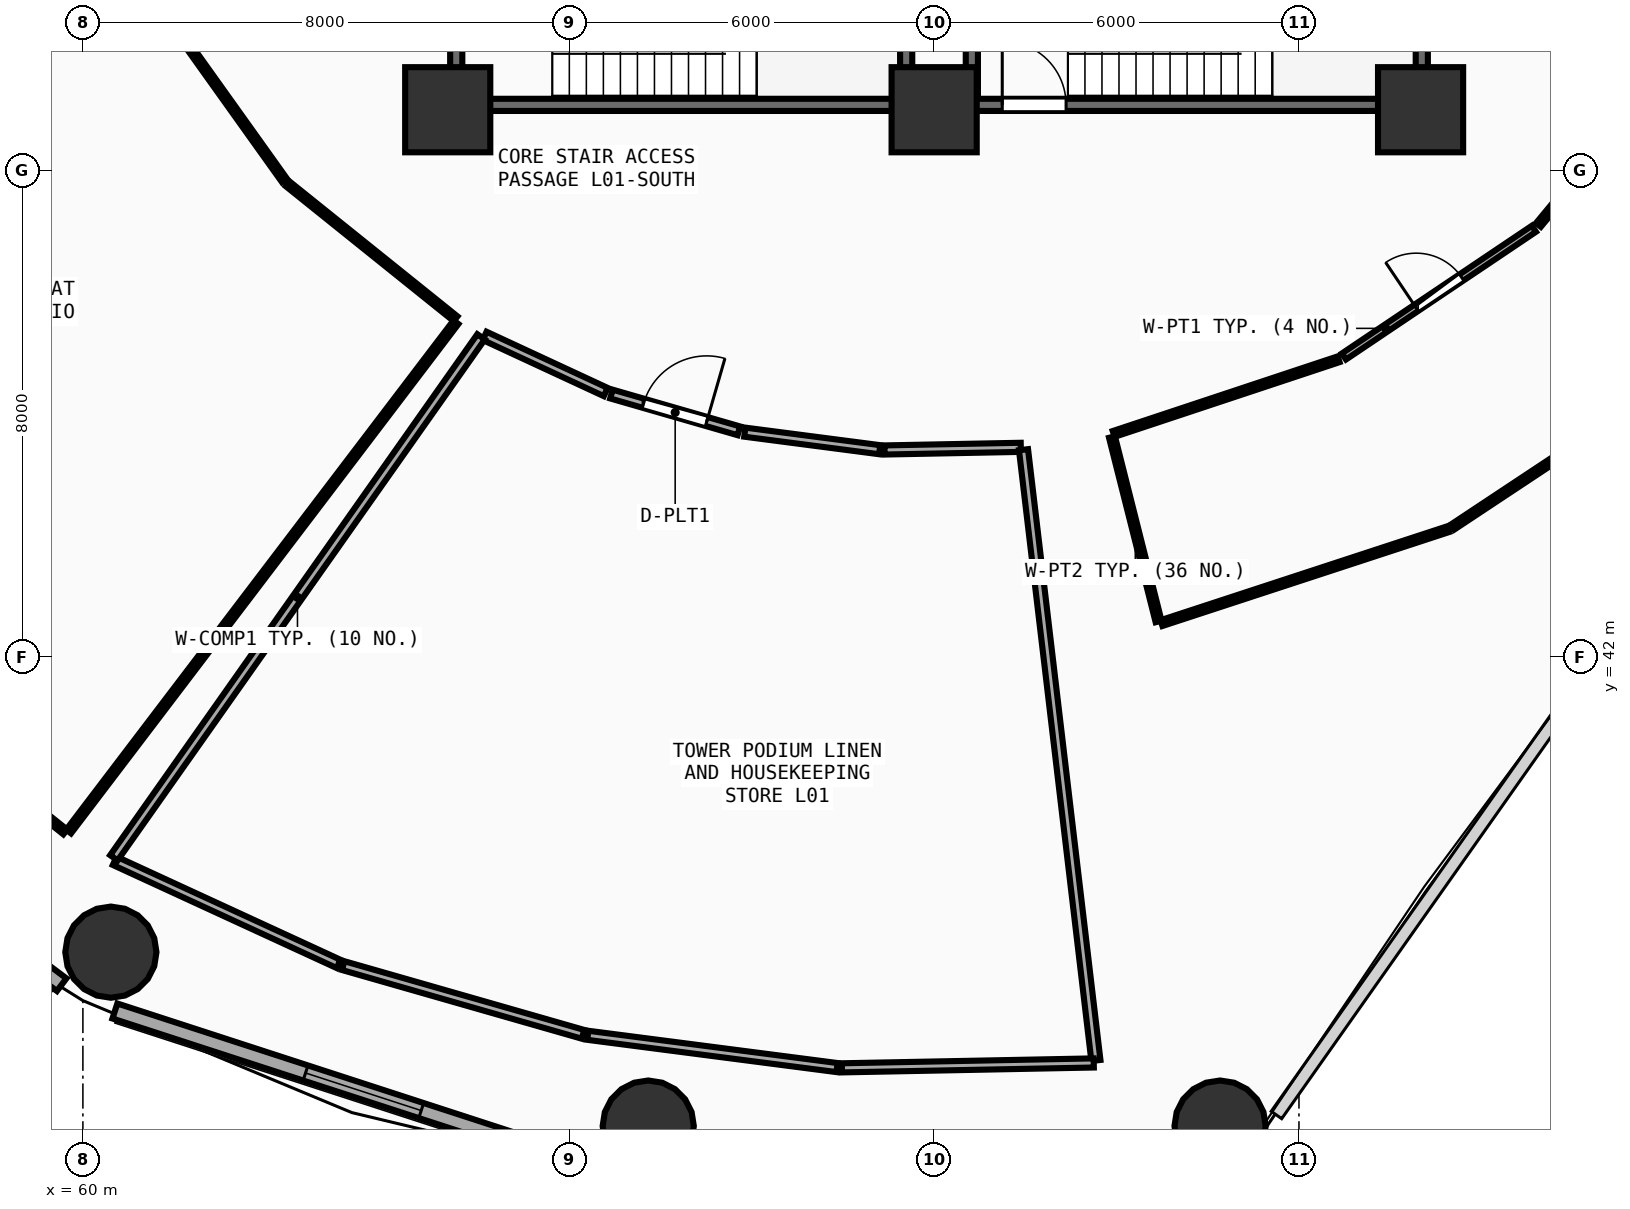
"""IFC4 building model, lengths in metres.
Left out: names, types, materials, properties, quantities, classifications, styles, units other than length and angle.
Written with IfcOpenShell. Run it as: python <this file> out.ifc"""

import sys

from ifc_helpers import new_model, si_unit, direction, frame, frame_2d, origin, origin_2d, place, context, subcontext, project, spatial, rectangle, circle, extrude, element, fill, save


model = new_model("IFC4")
c1 = context("Model", 3, precision=1e-05, world=origin(), true_north=direction((0.0, 1.0)))
c2 = subcontext(c1, "Body", "Model", "MODEL_VIEW")
j1 = project(units=[si_unit("LENGTHUNIT", "METRE"), si_unit("PLANEANGLEUNIT", "RADIAN")], contexts=[c1])
p1 = place(None, origin())
s1 = spatial("IfcSite", under=j1, at=p1, CompositionType="ELEMENT")
p2 = place(p1, origin())
s2 = spatial("IfcBuilding", under=s1, at=p2, CompositionType="ELEMENT")
p3 = place(p2, frame((0.0, 0.0, 4.5)))
s3 = spatial("IfcBuildingStorey", under=s2, at=p3, CompositionType="ELEMENT", Elevation=4.5)
for number, where, z_axis, x_axis in (
    (1, (66.0, 51.0, 0.0), (0.0, 0.0, 1.0), (1.0, 0.0, 0.0)),
    (2, (74.0, 51.0, 0.0), (0.0, 0.0, 1.0), (1.0, 0.0, 0.0)),
    (3, (82.0, 51.0, 0.0), (0.0, 0.0, 1.0), (1.0, 0.0, 0.0)),
):
    element("IfcColumn", number, at=place(p3, frame(where, z_axis=z_axis, x_axis=x_axis)), inside=s3, PredefinedType="PILASTER", context=c2, shape_type="SweptSolid", body=[
        extrude(rectangle(XDim=1.4, YDim=1.4, at=origin_2d()), origin(), (0.0, 0.0, 1.0), 4.5),
    ])
for number, where, z_axis, x_axis in (
    (4, (60.46, 37.146, 0.0), (0.0, 0.0, 1.0), (1.0, 0.0, 0.0)),
    (5, (69.298, 34.286, 0.0), (0.0, 0.0, 1.0), (1.0, 0.0, 0.0)),
    (6, (78.702, 34.286, 0.0), (0.0, 0.0, 1.0), (1.0, 0.0, 0.0)),
):
    element("IfcColumn", number, at=place(p3, frame(where, z_axis=z_axis, x_axis=x_axis)), inside=s3, PredefinedType="COLUMN", context=c2, shape_type="SweptSolid", body=[
        extrude(circle(Radius=0.75, at=origin_2d()), origin(), (0.0, 0.0, 1.0), 4.5),
    ])
p4 = place(p3, frame((53.016, 41.582, 0.0), z_axis=(0.0, 0.0, 1.0), x_axis=(0.80030733173, -0.599590005569, 0.0)))
e7 = element("IfcWall", 7, at=p4, inside=s3, PredefinedType="SOLIDWALL", context=c2, shape_type="SweptSolid", body=[
    extrude(rectangle(XDim=8.291, YDim=0.26, at=frame_2d((4.145, 0.0))), origin(), (0.0, 0.0, 1.0), 4.185),
])
p5 = place(p4, frame((3.145, 0.0, 0.85)))
e8 = element("IfcOpeningElement", 8, at=p5, cuts=e7, PredefinedType="OPENING", context=c2, shape_type="SweptSolid", body=[
    extrude(rectangle(XDim=2.0, YDim=1.75, at=frame_2d((1.0, 0.875))), frame((0.0, 0.14, 0.0), z_axis=(0.0, -1.0, 0.0), x_axis=(1.0, 0.0, 0.0)), (0.0, 0.0, 1.0), 0.28),
])
p6 = place(p3, frame((60.526, 36.178, 0.0), z_axis=(0.0, 0.0, 1.0), x_axis=(0.951039914291, -0.309068085421, 0.0)))
e9 = element("IfcWall", 9, at=p6, inside=s3, PredefinedType="SOLIDWALL", context=c2, shape_type="SweptSolid", body=[
    extrude(rectangle(XDim=8.594, YDim=0.26, at=frame_2d((4.297, 0.0))), origin(), (0.0, 0.0, 1.0), 4.185),
])
p7 = place(p6, frame((3.297, 0.0, 0.85)))
e10 = element("IfcOpeningElement", 10, at=p7, cuts=e9, PredefinedType="OPENING", context=c2, shape_type="SweptSolid", body=[
    extrude(rectangle(XDim=2.0, YDim=1.75, at=frame_2d((1.0, 0.875))), frame((0.0, 0.14, 0.0), z_axis=(0.0, -1.0, 0.0), x_axis=(1.0, 0.0, 0.0)), (0.0, 0.0, 1.0), 0.28),
])
p8 = place(p3, frame((74.0, 51.08, 0.0), z_axis=(0.0, 0.0, 1.0), x_axis=(1.0, 0.0, 0.0)))
e11 = element("IfcWall", 11, at=p8, inside=s3, PredefinedType="SHEAR", context=c2, shape_type="SweptSolid", body=[
    extrude(rectangle(XDim=7.9, YDim=0.2, at=frame_2d((3.95, 0.0))), origin(), (0.0, 0.0, 1.0), 4.2),
])
p9 = place(p8, frame((1.12, 0.0, 0.0)))
e12 = element("IfcOpeningElement", 12, at=p9, cuts=e11, PredefinedType="OPENING", context=c2, shape_type="SweptSolid", body=[
    extrude(rectangle(XDim=1.05, YDim=2.1, at=frame_2d((0.525, 1.05))), frame((0.0, 0.11, 0.0), z_axis=(0.0, -1.0, 0.0), x_axis=(1.0, 0.0, 0.0)), (0.0, 0.0, 1.0), 0.22),
])
for number, where, z_axis, x_axis in (
    (13, (82.02, 51.2, 0.0), (0.0, 0.0, 1.0), (0.0, 1.0, 0.0)),
    (14, (74.62, 54.27, 0.0), (0.0, 0.0, 1.0), (0.0, -1.0, 0.0)),
):
    element("IfcWall", number, at=place(p3, frame(where, z_axis=z_axis, x_axis=x_axis)), inside=s3, PredefinedType="SHEAR", context=c2, shape_type="SweptSolid", body=[
        extrude(rectangle(XDim=3.07, YDim=0.2, at=frame_2d((1.535, 0.0))), origin(), (0.0, 0.0, 1.0), 4.2),
    ])
p10 = place(p3, frame((66.26, 51.08, 0.0), z_axis=(0.0, 0.0, 1.0), x_axis=(1.0, 0.0, 0.0)))
e15 = element("IfcWall", 15, at=p10, inside=s3, PredefinedType="SHEAR", context=c2, shape_type="SweptSolid", body=[
    extrude(rectangle(XDim=7.16, YDim=0.2, at=frame_2d((3.58, 0.0))), origin(), (0.0, 0.0, 1.0), 4.2),
])
p11 = place(p3, frame((73.54, 51.2, 0.0), z_axis=(0.0, 0.0, 1.0), x_axis=(0.0, 1.0, 0.0)))
e16 = element("IfcWall", 16, at=p11, inside=s3, PredefinedType="SHEAR", context=c2, shape_type="SweptSolid", body=[
    extrude(rectangle(XDim=3.07, YDim=0.2, at=frame_2d((1.535, 0.0))), origin(), (0.0, 0.0, 1.0), 4.2),
])
p12 = place(p3, frame((66.14, 54.27, 0.0), z_axis=(0.0, 0.0, 1.0), x_axis=(0.0, -1.0, 0.0)))
e17 = element("IfcWall", 17, at=p12, inside=s3, PredefinedType="SHEAR", context=c2, shape_type="SweptSolid", body=[
    extrude(rectangle(XDim=3.07, YDim=0.2, at=frame_2d((1.535, 0.0))), origin(), (0.0, 0.0, 1.0), 4.2),
])
p13 = place(p12, frame((1.01, 0.0, 0.0)))
e18 = element("IfcOpeningElement", 18, at=p13, cuts=e17, PredefinedType="OPENING", context=c2, shape_type="SweptSolid", body=[
    extrude(rectangle(XDim=1.05, YDim=2.1, at=frame_2d((0.525, 1.05))), frame((0.0, 0.11, 0.0), z_axis=(0.0, -1.0, 0.0), x_axis=(1.0, 0.0, 0.0)), (0.0, 0.0, 1.0), 0.22),
])
p14 = place(p3, frame((68.693, 46.324, 0.0), z_axis=(0.0, 0.0, 1.0), x_axis=(0.960768545707, -0.277351404504, 0.0)))
e19 = element("IfcWall", 19, at=p14, inside=s3, PredefinedType="PARTITIONING", context=c2, shape_type="SweptSolid", body=[
    extrude(rectangle(XDim=2.181, YDim=0.15, at=frame_2d((1.091, 0.0))), origin(), (0.0, 0.0, 1.0), 4.19),
])
p15 = place(p14, frame((0.551, 0.0, 0.0)))
e20 = element("IfcOpeningElement", 20, at=p15, cuts=e19, PredefinedType="OPENING", context=c2, shape_type="SweptSolid", body=[
    extrude(rectangle(XDim=1.08, YDim=2.1, at=frame_2d((0.54, 1.05))), frame((0.0, 0.085, 0.0), z_axis=(0.0, -1.0, 0.0), x_axis=(1.0, 0.0, 0.0)), (0.0, 0.0, 1.0), 0.17),
])
p16 = place(p3, frame((80.74, 46.942, 0.0), z_axis=(0.0, 0.0, 1.0), x_axis=(0.829949208051, 0.557838966061, 0.0)))
e21 = element("IfcWall", 21, at=p16, inside=s3, PredefinedType="PARTITIONING", context=c2, shape_type="SweptSolid", body=[
    extrude(rectangle(XDim=3.765, YDim=0.12, at=frame_2d((1.882, 0.0))), origin(), (0.0, 0.0, 1.0), 3.585),
])
p17 = place(p16, frame((1.432, 0.0, 0.0)))
e22 = element("IfcOpeningElement", 22, at=p17, cuts=e21, PredefinedType="OPENING", context=c2, shape_type="SweptSolid", body=[
    extrude(rectangle(XDim=0.9, YDim=2.08, at=frame_2d((0.45, 1.04))), frame((0.0, 0.07, 0.0), z_axis=(0.0, -1.0, 0.0), x_axis=(1.0, 0.0, 0.0)), (0.0, 0.0, 1.0), 0.14),
])
p18 = place(p3, frame((61.317, 52.635, 0.0), z_axis=(0.0, 0.0, 1.0), x_axis=(0.581265057715, -0.813714281968, 0.0)))
e23 = element("IfcWall", 23, at=p18, inside=s3, PredefinedType="PARTITIONING", context=c2, shape_type="SweptSolid", body=[
    extrude(rectangle(XDim=3.439, YDim=0.1, at=frame_2d((1.719, 0.0))), origin(), (0.0, 0.0, 1.0), 3.585),
])
p19 = place(p3, frame((63.37, 49.779, 0.0), z_axis=(0.0, 0.0, 1.0), x_axis=(0.779622016763, -0.626250358067, 0.0)))
e24 = element("IfcWall", 24, at=p19, inside=s3, PredefinedType="PARTITIONING", context=c2, shape_type="SweptSolid", body=[
    extrude(rectangle(XDim=3.539, YDim=0.1, at=frame_2d((1.769, 0.0))), origin(), (0.0, 0.0, 1.0), 3.585),
])
p20 = place(p3, frame((66.136, 47.506, 0.0), z_axis=(0.0, 0.0, 1.0), x_axis=(-0.605364986989, -0.795948008684, 0.0)))
e25 = element("IfcWall", 25, at=p20, inside=s3, PredefinedType="PARTITIONING", context=c2, shape_type="SweptSolid", body=[
    extrude(rectangle(XDim=10.524, YDim=0.1, at=frame_2d((5.262, 0.0))), origin(), (0.0, 0.0, 1.0), 3.585),
])
p21 = place(p3, frame((59.71, 39.123, 0.0), z_axis=(0.0, 0.0, 1.0), x_axis=(-0.781602893215, 0.623776335972, 0.0)))
e26 = element("IfcWall", 26, at=p21, inside=s3, PredefinedType="PARTITIONING", context=c2, shape_type="SweptSolid", body=[
    extrude(rectangle(XDim=6.485, YDim=0.1, at=frame_2d((3.242, 0.0))), origin(), (0.0, 0.0, 1.0), 4.19),
])
p22 = place(p3, frame((66.607, 47.281, 0.0), z_axis=(0.0, 0.0, 1.0), x_axis=(0.907209153003, -0.420679869625, 0.0)))
e27 = element("IfcWall", 27, at=p22, inside=s3, PredefinedType="PARTITIONING", context=c2, shape_type="SweptSolid", body=[
    extrude(rectangle(XDim=2.195, YDim=0.15, at=frame_2d((1.097, 0.0))), origin(), (0.0, 0.0, 1.0), 3.585),
])
p23 = place(p3, frame((70.886, 45.698, 0.0), z_axis=(0.0, 0.0, 1.0), x_axis=(0.99164598848, -0.128989276811, 0.0)))
e28 = element("IfcWall", 28, at=p23, inside=s3, PredefinedType="PARTITIONING", context=c2, shape_type="SweptSolid", body=[
    extrude(rectangle(XDim=2.237, YDim=0.15, at=frame_2d((1.119, 0.0))), origin(), (0.0, 0.0, 1.0), 4.19),
])
p24 = place(p3, frame((73.184, 45.405, 0.0), z_axis=(0.0, 0.0, 1.0), x_axis=(0.999812026425, 0.019388445441, 0.0)))
e29 = element("IfcWall", 29, at=p24, inside=s3, PredefinedType="PARTITIONING", context=c2, shape_type="SweptSolid", body=[
    extrude(rectangle(XDim=2.241, YDim=0.15, at=frame_2d((1.121, 0.0))), origin(), (0.0, 0.0, 1.0), 4.19),
])
p25 = place(p3, frame((75.47, 45.409, 0.0), z_axis=(0.0, 0.0, 1.0), x_axis=(0.117716479822, -0.993047244787, 0.0)))
e30 = element("IfcWall", 30, at=p25, inside=s3, PredefinedType="PARTITIONING", context=c2, shape_type="SweptSolid", body=[
    extrude(rectangle(XDim=10.115, YDim=0.15, at=frame_2d((5.057, 0.0))), origin(), (0.0, 0.0, 1.0), 3.885),
])
p26 = place(p3, frame((76.625, 35.324, 0.0), z_axis=(0.0, 0.0, 1.0), x_axis=(-0.999812033518, -0.019388079631, 0.0)))
e31 = element("IfcWall", 31, at=p26, inside=s3, PredefinedType="PARTITIONING", context=c2, shape_type="SweptSolid", body=[
    extrude(rectangle(XDim=4.143, YDim=0.15, at=frame_2d((2.071, 0.0))), origin(), (0.0, 0.0, 1.0), 4.19),
])
p27 = place(p3, frame((72.403, 35.248, 0.0), z_axis=(0.0, 0.0, 1.0), x_axis=(-0.991723129769, 0.128394835881, 0.0)))
e32 = element("IfcWall", 32, at=p27, inside=s3, PredefinedType="PARTITIONING", context=c2, shape_type="SweptSolid", body=[
    extrude(rectangle(XDim=4.134, YDim=0.15, at=frame_2d((2.067, 0.0))), origin(), (0.0, 0.0, 1.0), 3.585),
])
p28 = place(p3, frame((68.226, 35.795, 0.0), z_axis=(0.0, 0.0, 1.0), x_axis=(-0.961332891956, 0.275388944666, 0.0)))
e33 = element("IfcWall", 33, at=p28, inside=s3, PredefinedType="PARTITIONING", context=c2, shape_type="SweptSolid", body=[
    extrude(rectangle(XDim=4.104, YDim=0.15, at=frame_2d((2.052, 0.0))), origin(), (0.0, 0.0, 1.0), 4.19),
])
p29 = place(p3, frame((64.206, 36.953, 0.0), z_axis=(0.0, 0.0, 1.0), x_axis=(-0.908344989121, 0.418221688508, 0.0)))
e34 = element("IfcWall", 34, at=p29, inside=s3, PredefinedType="PARTITIONING", context=c2, shape_type="SweptSolid", body=[
    extrude(rectangle(XDim=4.054, YDim=0.15, at=frame_2d((2.027, 0.0))), origin(), (0.0, 0.0, 1.0), 3.585),
])
p30 = place(p3, frame((60.51, 38.698, 0.0), z_axis=(0.0, 0.0, 1.0), x_axis=(0.576068501476, 0.817401420116, 0.0)))
e35 = element("IfcWall", 35, at=p30, inside=s3, PredefinedType="PARTITIONING", context=c2, shape_type="SweptSolid", body=[
    extrude(rectangle(XDim=10.481, YDim=0.15, at=frame_2d((5.241, 0.0))), origin(), (0.0, 0.0, 1.0), 3.585),
])
p31 = place(p3, frame((76.953, 45.669, 0.0), z_axis=(0.0, 0.0, 1.0), x_axis=(0.949089658177, 0.31500606461, 0.0)))
e36 = element("IfcWall", 36, at=p31, inside=s3, PredefinedType="PARTITIONING", context=c2, shape_type="SweptSolid", body=[
    extrude(rectangle(XDim=3.898, YDim=0.1, at=frame_2d((1.949, 0.0))), origin(), (0.0, 0.0, 1.0), 4.19),
])
p32 = place(p3, frame((83.939, 49.107, 0.0), z_axis=(0.0, 0.0, 1.0), x_axis=(0.638393231466, 0.769710388405, 0.0)))
e37 = element("IfcWall", 37, at=p32, inside=s3, PredefinedType="PARTITIONING", context=c2, shape_type="SweptSolid", body=[
    extrude(rectangle(XDim=3.69, YDim=0.1, at=frame_2d((1.845, 0.0))), origin(), (0.0, 0.0, 1.0), 3.585),
])
p33 = place(p3, frame((86.554, 46.806, 0.0), z_axis=(0.0, 0.0, 1.0), x_axis=(-0.833594148674, -0.552377402956, 0.0)))
e38 = element("IfcWall", 38, at=p33, inside=s3, PredefinedType="PARTITIONING", context=c2, shape_type="SweptSolid", body=[
    extrude(rectangle(XDim=4.831, YDim=0.1, at=frame_2d((2.416, 0.0))), origin(), (0.0, 0.0, 1.0), 3.585),
])
p34 = place(p3, frame((82.455, 44.103, 0.0), z_axis=(0.0, 0.0, 1.0), x_axis=(-0.950308776872, -0.311308895794, 0.0)))
e39 = element("IfcWall", 39, at=p34, inside=s3, PredefinedType="PARTITIONING", context=c2, shape_type="SweptSolid", body=[
    extrude(rectangle(XDim=4.963, YDim=0.1, at=frame_2d((2.481, 0.0))), origin(), (0.0, 0.0, 1.0), 3.585),
])
p35 = place(p3, frame((77.691, 42.584, 0.0), z_axis=(0.0, 0.0, 1.0), x_axis=(-0.244940078033, 0.969538219037, 0.0)))
e40 = element("IfcWall", 40, at=p35, inside=s3, PredefinedType="PARTITIONING", context=c2, shape_type="SweptSolid", body=[
    extrude(rectangle(XDim=3.129, YDim=0.1, at=frame_2d((1.564, 0.0))), origin(), (0.0, 0.0, 1.0), 3.945),
])
p36 = place(p7, origin())
e41 = element("IfcWindow", 41, at=p36, inside=s3, PartitioningType="SINGLE_PANEL", PredefinedType="WINDOW", context=c2, shape_type="SweptSolid", body=[
    extrude(rectangle(XDim=2.0, YDim=1.75, at=frame_2d((1.0, 0.875))), frame((0.0, 0.03, 0.0), z_axis=(0.0, -1.0, 0.0), x_axis=(1.0, 0.0, 0.0)), (0.0, 0.0, 1.0), 0.06),
])
fill(e10, e41)
p37 = place(p9, origin())
e42 = element("IfcDoor", 42, at=p37, inside=s3, OperationType="SINGLE_SWING_LEFT", PredefinedType="DOOR", context=c2, shape_type="SweptSolid", body=[
    extrude(rectangle(XDim=1.05, YDim=2.1, at=frame_2d((0.525, 1.05))), frame((0.0, 0.025, 0.0), z_axis=(0.0, -1.0, 0.0), x_axis=(1.0, 0.0, 0.0)), (0.0, 0.0, 1.0), 0.05),
])
fill(e12, e42)
p38 = place(p15, origin())
e43 = element("IfcDoor", 43, at=p38, inside=s3, OperationType="SINGLE_SWING_RIGHT", PredefinedType="DOOR", context=c2, shape_type="SweptSolid", body=[
    extrude(rectangle(XDim=1.08, YDim=2.1, at=frame_2d((0.54, 1.05))), frame((0.0, 0.025, 0.0), z_axis=(0.0, -1.0, 0.0), x_axis=(1.0, 0.0, 0.0)), (0.0, 0.0, 1.0), 0.05),
])
fill(e20, e43)
p39 = place(p17, origin())
e44 = element("IfcDoor", 44, at=p39, inside=s3, OperationType="SINGLE_SWING_LEFT", PredefinedType="DOOR", context=c2, shape_type="SweptSolid", body=[
    extrude(rectangle(XDim=0.9, YDim=2.08, at=frame_2d((0.45, 1.04))), frame((0.0, 0.025, 0.0), z_axis=(0.0, -1.0, 0.0), x_axis=(1.0, 0.0, 0.0)), (0.0, 0.0, 1.0), 0.05),
])
fill(e22, e44)
save(model, sys.argv[1])
